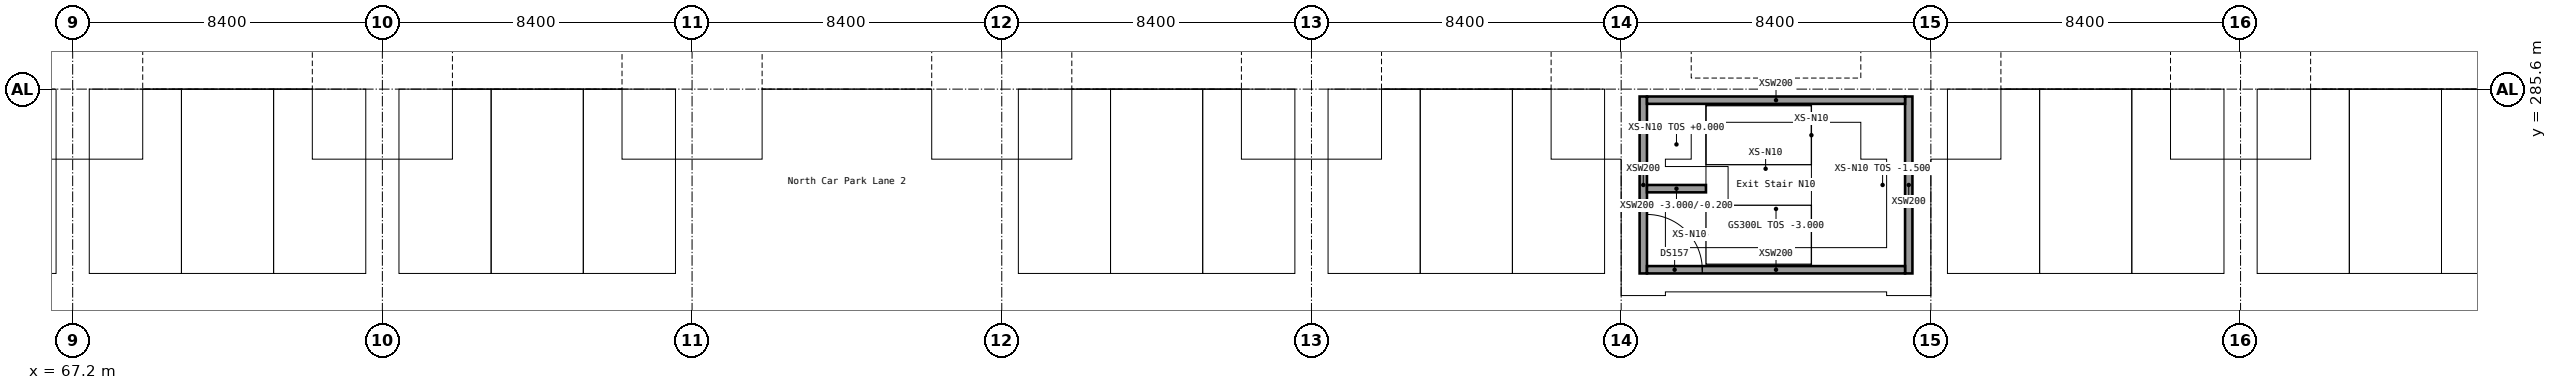
"""IFC4 building model, lengths in metres.
Left out: names, types, materials, properties, quantities, classifications, styles, units other than length and angle.
Written with IfcOpenShell. Run it as: python <this file> out.ifc"""

import sys

from ifc_helpers import new_model, si_unit, direction, frame, frame_2d, origin, origin_2d, place, context, subcontext, project, spatial, rectangle, extrude, element, fill, save


model = new_model("IFC4")
c1 = context("Model", 3, precision=1e-05, world=origin(), true_north=direction((0.0, 1.0)))
c2 = subcontext(c1, "Body", "Model", "MODEL_VIEW")
j1 = project(units=[si_unit("LENGTHUNIT", "METRE"), si_unit("PLANEANGLEUNIT", "RADIAN")], contexts=[c1])
p1 = place(None, origin())
s1 = spatial("IfcSite", under=j1, at=p1, CompositionType="ELEMENT")
p2 = place(p1, origin())
s2 = spatial("IfcBuilding", under=s1, at=p2, CompositionType="ELEMENT")
p3 = place(p2, frame((0.0, 0.0, -3.0)))
s3 = spatial("IfcBuildingStorey", under=s2, at=p3, CompositionType="ELEMENT", Elevation=-3.0)
for number, where, z_axis, x_axis in (
    (1, (109.8, 280.6, 0.0), (0.0, 0.0, 1.0), (0.0, 1.0, 0.0)),
    (2, (117.0, 280.6, 0.0), (0.0, 0.0, 1.0), (0.0, 1.0, 0.0)),
):
    element("IfcWall", number, at=place(p3, frame(where, z_axis=z_axis, x_axis=x_axis)), inside=s3, PredefinedType="SOLIDWALL", context=c2, shape_type="SweptSolid", body=[
        extrude(rectangle(XDim=4.8, YDim=0.2, at=frame_2d((2.4, 0.0))), origin(), (0.0, 0.0, 1.0), 3.0),
    ])
p4 = place(p3, frame((109.9, 280.7, 0.0), z_axis=(0.0, 0.0, 1.0), x_axis=(1.0, 0.0, 0.0)))
e3 = element("IfcWall", 3, at=p4, inside=s3, PredefinedType="SOLIDWALL", context=c2, shape_type="SweptSolid", body=[
    extrude(rectangle(XDim=7.0, YDim=0.2, at=frame_2d((3.5, 0.0))), origin(), (0.0, 0.0, 1.0), 3.0),
])
p5 = place(p4, origin())
e4 = element("IfcOpeningElement", 4, at=p5, cuts=e3, PredefinedType="OPENING", context=c2, shape_type="SweptSolid", body=[
    extrude(rectangle(XDim=1.5, YDim=2.1, at=frame_2d((0.75, 1.05))), frame((0.0, 0.1, 0.0), z_axis=(0.0, -1.0, 0.0), x_axis=(1.0, 0.0, 0.0)), (0.0, 0.0, 1.0), 0.2),
])
p6 = place(p3, frame((109.9, 285.3, 0.0), z_axis=(0.0, 0.0, 1.0), x_axis=(1.0, 0.0, 0.0)))
e5 = element("IfcWall", 5, at=p6, inside=s3, PredefinedType="SOLIDWALL", context=c2, shape_type="SweptSolid", body=[
    extrude(rectangle(XDim=7.0, YDim=0.2, at=frame_2d((3.5, 0.0))), origin(), (0.0, 0.0, 1.0), 3.0),
])
p7 = place(p3, frame((109.9, 282.9, 0.0), z_axis=(0.0, 0.0, 1.0), x_axis=(1.0, 0.0, 0.0)))
e6 = element("IfcWall", 6, at=p7, inside=s3, PredefinedType="SOLIDWALL", context=c2, shape_type="SweptSolid", body=[
    extrude(rectangle(XDim=1.6, YDim=0.2, at=frame_2d((0.8, 0.0))), origin(), (0.0, 0.0, 1.0), 2.8),
])
for number, where, z_axis, x_axis in (
    (7, (67.2, 285.6, 0.0), (0.0, 0.0, 1.0), (1.0, 0.0, 0.0)),
    (8, (75.6, 285.6, 0.0), (0.0, 0.0, 1.0), (1.0, 0.0, 0.0)),
    (9, (84.0, 285.6, 0.0), (0.0, 0.0, 1.0), (1.0, 0.0, 0.0)),
    (10, (92.4, 285.6, 0.0), (0.0, 0.0, 1.0), (1.0, 0.0, 0.0)),
    (11, (100.8, 285.6, 0.0), (0.0, 0.0, 1.0), (1.0, 0.0, 0.0)),
    (12, (109.2, 285.6, 0.0), (0.0, 0.0, 1.0), (1.0, 0.0, 0.0)),
    (13, (117.6, 285.6, 0.0), (0.0, 0.0, 1.0), (1.0, 0.0, 0.0)),
    (14, (126.0, 285.6, 0.0), (0.0, 0.0, 1.0), (1.0, 0.0, 0.0)),
):
    element("IfcColumn", number, at=place(p3, frame(where, z_axis=z_axis, x_axis=x_axis)), inside=s3, PredefinedType="COLUMN", context=c2, shape_type="SweptSolid", body=[
        extrude(rectangle(XDim=0.8, YDim=0.8, at=origin_2d()), origin(), (0.0, 0.0, 1.0), 2.4),
    ])
p8 = place(p5, origin())
e15 = element("IfcDoor", 15, at=p8, inside=s3, OperationType="SINGLE_SWING_LEFT", PredefinedType="DOOR", context=c2, shape_type="SweptSolid", body=[
    extrude(rectangle(XDim=1.5, YDim=2.1, at=frame_2d((0.75, 1.05))), frame((0.0, 0.025, 0.0), z_axis=(0.0, -1.0, 0.0), x_axis=(1.0, 0.0, 0.0)), (0.0, 0.0, 1.0), 0.05),
])
fill(e4, e15)
save(model, sys.argv[1])
